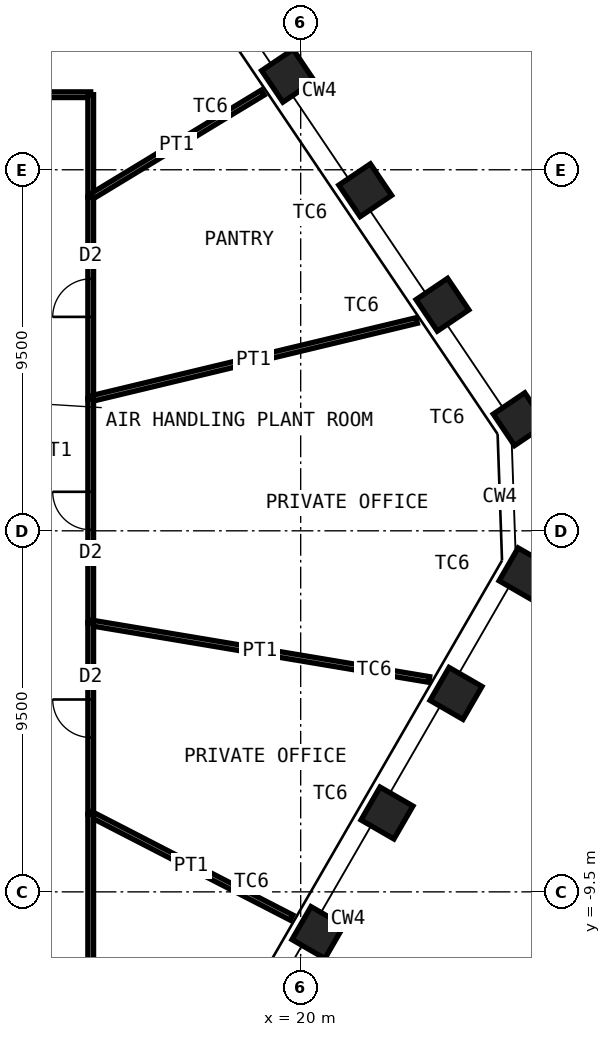
"""IFC4 building model, lengths in metres.
Left out: names, types, materials, properties, quantities, classifications, styles, units other than length and angle.
Written with IfcOpenShell. Run it as: python <this file> out.ifc"""

import sys

from ifc_helpers import new_model, si_unit, direction, frame, frame_2d, origin, origin_2d, place, context, subcontext, project, spatial, rectangle, hollow_rectangle, extrude, element, fill, save


model = new_model("IFC4")
c1 = context("Model", 3, precision=1e-05, world=origin(), true_north=direction((0.0, 1.0)))
c2 = subcontext(c1, "Body", "Model", "MODEL_VIEW")
j1 = project(units=[si_unit("LENGTHUNIT", "METRE"), si_unit("PLANEANGLEUNIT", "RADIAN")], contexts=[c1])
p1 = place(None, origin())
s1 = spatial("IfcSite", under=j1, at=p1, CompositionType="ELEMENT")
p2 = place(p1, origin())
s2 = spatial("IfcBuilding", under=s1, at=p2, CompositionType="ELEMENT")
p3 = place(p2, frame((0.0, 0.0, 222.4)))
s3 = spatial("IfcBuildingStorey", under=s2, at=p3, CompositionType="ELEMENT", Elevation=222.4)
for number, where, z_axis, x_axis in (
    (1, (19.667, 11.973, 0.0), (0.0, 0.0, 1.0), (-0.559, 0.829, 0.0)),
    (2, (21.699, 8.961, 0.0), (0.0, 0.0, 1.0), (-0.559, 0.829, 0.0)),
    (3, (23.731, 5.948, 0.0), (0.0, 0.0, 1.0), (-0.559, 0.829, 0.0)),
    (4, (25.762, 2.936, 0.0), (0.0, 0.0, 1.0), (-0.559, 0.829, 0.0)),
    (5, (25.905, -1.132, 0.0), (0.0, 0.0, 1.0), (0.5, 0.866, 0.0)),
    (6, (24.088, -4.279, 0.0), (0.0, 0.0, 1.0), (0.5, 0.866, 0.0)),
    (7, (22.271, -7.426, 0.0), (0.0, 0.0, 1.0), (0.5, 0.866, 0.0)),
    (8, (20.454, -10.572, 0.0), (0.0, 0.0, 1.0), (0.5, 0.866, 0.0)),
):
    element("IfcColumn", number, at=place(p3, frame(where, z_axis=z_axis, x_axis=x_axis)), inside=s3, PredefinedType="COLUMN", context=c2, shape_type="SweptSolid", body=[
        extrude(hollow_rectangle(XDim=1.0, YDim=1.0, WallThickness=0.06, at=origin_2d()), origin(), (0.0, 0.0, 1.0), 4.2),
    ])
p4 = place(p3, frame((-0.551, 11.475, 0.0), z_axis=(0.0, 0.0, 1.0), x_axis=(1.0, 0.0, 0.0)))
e9 = element("IfcWall", 9, at=p4, inside=s3, PredefinedType="PARTITIONING", context=c2, shape_type="SweptSolid", body=[
    extrude(rectangle(XDim=15.026, YDim=0.15, at=frame_2d((7.513, 0.0))), origin(), (0.0, 0.0, 1.0), 4.03),
])
p5 = place(p4, frame((6.613, 0.0, 0.0)))
e10 = element("IfcOpeningElement", 10, at=p5, cuts=e9, PredefinedType="OPENING", context=c2, shape_type="SweptSolid", body=[
    extrude(rectangle(XDim=1.8, YDim=2.4, at=frame_2d((0.9, 1.2))), frame((0.0, 0.085, 0.0), z_axis=(0.0, -1.0, 0.0), x_axis=(1.0, 0.0, 0.0)), (0.0, 0.0, 1.0), 0.17),
])
p6 = place(p3, frame((14.475, 11.475, 0.0), z_axis=(0.0, 0.0, 1.0), x_axis=(0.0, -1.0, 0.0)))
e11 = element("IfcWall", 11, at=p6, inside=s3, PredefinedType="PARTITIONING", context=c2, shape_type="SweptSolid", body=[
    extrude(rectangle(XDim=2.692, YDim=0.15, at=frame_2d((1.346, 0.0))), origin(), (0.0, 0.0, 1.0), 4.03),
])
p7 = place(p3, frame((19.001, 11.53, 0.0), z_axis=(0.0, 0.0, 1.0), x_axis=(-0.854906581035, -0.518781975114, 0.0)))
e12 = element("IfcWall", 12, at=p7, inside=s3, PredefinedType="PARTITIONING", context=c2, shape_type="SweptSolid", body=[
    extrude(rectangle(XDim=5.294, YDim=0.15, at=frame_2d((2.647, 0.0))), origin(), (0.0, 0.0, 1.0), 3.43),
])
p8 = place(p3, frame((14.475, 8.783, 0.0), z_axis=(0.0, 0.0, 1.0), x_axis=(0.0, -1.0, 0.0)))
e13 = element("IfcWall", 13, at=p8, inside=s3, PredefinedType="PARTITIONING", context=c2, shape_type="SweptSolid", body=[
    extrude(rectangle(XDim=5.309, YDim=0.15, at=frame_2d((2.654, 0.0))), origin(), (0.0, 0.0, 1.0), 4.03),
])
p9 = place(p8, frame((2.154, 0.0, 0.0)))
e14 = element("IfcOpeningElement", 14, at=p9, cuts=e13, PredefinedType="OPENING", context=c2, shape_type="SweptSolid", body=[
    extrude(rectangle(XDim=1.0, YDim=2.4, at=frame_2d((0.5, 1.2))), frame((0.0, 0.085, 0.0), z_axis=(0.0, -1.0, 0.0), x_axis=(1.0, 0.0, 0.0)), (0.0, 0.0, 1.0), 0.17),
])
p10 = place(p3, frame((23.053, 5.534, 0.0), z_axis=(0.0, 0.0, 1.0), x_axis=(-0.972377252501, -0.233414821335, 0.0)))
e15 = element("IfcWall", 15, at=p10, inside=s3, PredefinedType="PARTITIONING", context=c2, shape_type="SweptSolid", body=[
    extrude(rectangle(XDim=8.822, YDim=0.15, at=frame_2d((4.411, 0.0))), origin(), (0.0, 0.0, 1.0), 3.43),
])
p11 = place(p3, frame((14.475, 3.475, 0.0), z_axis=(0.0, 0.0, 1.0), x_axis=(0.0, -1.0, 0.0)))
e16 = element("IfcWall", 16, at=p11, inside=s3, PredefinedType="PARTITIONING", context=c2, shape_type="SweptSolid", body=[
    extrude(rectangle(XDim=5.896, YDim=0.15, at=frame_2d((2.948, 0.0))), origin(), (0.0, 0.0, 1.0), 4.03),
])
p12 = place(p11, frame((2.448, 0.0, 0.0)))
e17 = element("IfcOpeningElement", 17, at=p12, cuts=e16, PredefinedType="OPENING", context=c2, shape_type="SweptSolid", body=[
    extrude(rectangle(XDim=1.0, YDim=2.4, at=frame_2d((0.5, 1.2))), frame((0.0, 0.085, 0.0), z_axis=(0.0, -1.0, 0.0), x_axis=(1.0, 0.0, 0.0)), (0.0, 0.0, 1.0), 0.17),
])
p13 = place(p3, frame((23.383, -3.912, 0.0), z_axis=(0.0, 0.0, 1.0), x_axis=(-0.986293651891, 0.164999491631, 0.0)))
e18 = element("IfcWall", 18, at=p13, inside=s3, PredefinedType="PARTITIONING", context=c2, shape_type="SweptSolid", body=[
    extrude(rectangle(XDim=9.032, YDim=0.15, at=frame_2d((4.516, 0.0))), origin(), (0.0, 0.0, 1.0), 3.43),
])
p14 = place(p3, frame((14.475, -2.422, 0.0), z_axis=(0.0, 0.0, 1.0), x_axis=(0.0, -1.0, 0.0)))
e19 = element("IfcWall", 19, at=p14, inside=s3, PredefinedType="PARTITIONING", context=c2, shape_type="SweptSolid", body=[
    extrude(rectangle(XDim=5.033, YDim=0.15, at=frame_2d((2.517, 0.0))), origin(), (0.0, 0.0, 1.0), 4.03),
])
p15 = place(p14, frame((2.017, 0.0, 0.0)))
e20 = element("IfcOpeningElement", 20, at=p15, cuts=e19, PredefinedType="OPENING", context=c2, shape_type="SweptSolid", body=[
    extrude(rectangle(XDim=1.0, YDim=2.4, at=frame_2d((0.5, 1.2))), frame((0.0, 0.085, 0.0), z_axis=(0.0, -1.0, 0.0), x_axis=(1.0, 0.0, 0.0)), (0.0, 0.0, 1.0), 0.17),
])
p16 = place(p3, frame((19.759, -10.177, 0.0), z_axis=(0.0, 0.0, 1.0), x_axis=(-0.889015092721, 0.457877893017, 0.0)))
e21 = element("IfcWall", 21, at=p16, inside=s3, PredefinedType="PARTITIONING", context=c2, shape_type="SweptSolid", body=[
    extrude(rectangle(XDim=5.944, YDim=0.15, at=frame_2d((2.972, 0.0))), origin(), (0.0, 0.0, 1.0), 3.43),
])
p17 = place(p3, frame((14.475, -7.455, 0.0), z_axis=(0.0, 0.0, 1.0), x_axis=(0.0, -1.0, 0.0)))
e22 = element("IfcWall", 22, at=p17, inside=s3, PredefinedType="PARTITIONING", context=c2, shape_type="SweptSolid", body=[
    extrude(rectangle(XDim=4.02, YDim=0.15, at=frame_2d((2.01, 0.0))), origin(), (0.0, 0.0, 1.0), 4.03),
])
p18 = place(p9, origin())
e23 = element("IfcDoor", 23, at=p18, inside=s3, OperationType="SINGLE_SWING_RIGHT", PredefinedType="DOOR", context=c2, shape_type="SweptSolid", body=[
    extrude(rectangle(XDim=1.0, YDim=2.4, at=frame_2d((0.5, 1.2))), frame((0.0, 0.025, 0.0), z_axis=(0.0, -1.0, 0.0), x_axis=(1.0, 0.0, 0.0)), (0.0, 0.0, 1.0), 0.05),
])
fill(e14, e23)
p19 = place(p12, origin())
e24 = element("IfcDoor", 24, at=p19, inside=s3, OperationType="SINGLE_SWING_LEFT", PredefinedType="DOOR", context=c2, shape_type="SweptSolid", body=[
    extrude(rectangle(XDim=1.0, YDim=2.4, at=frame_2d((0.5, 1.2))), frame((0.0, 0.025, 0.0), z_axis=(0.0, -1.0, 0.0), x_axis=(1.0, 0.0, 0.0)), (0.0, 0.0, 1.0), 0.05),
])
fill(e17, e24)
p20 = place(p15, origin())
e25 = element("IfcDoor", 25, at=p20, inside=s3, OperationType="SINGLE_SWING_LEFT", PredefinedType="DOOR", context=c2, shape_type="SweptSolid", body=[
    extrude(rectangle(XDim=1.0, YDim=2.4, at=frame_2d((0.5, 1.2))), frame((0.0, 0.025, 0.0), z_axis=(0.0, -1.0, 0.0), x_axis=(1.0, 0.0, 0.0)), (0.0, 0.0, 1.0), 0.05),
])
fill(e20, e25)
save(model, sys.argv[1])
